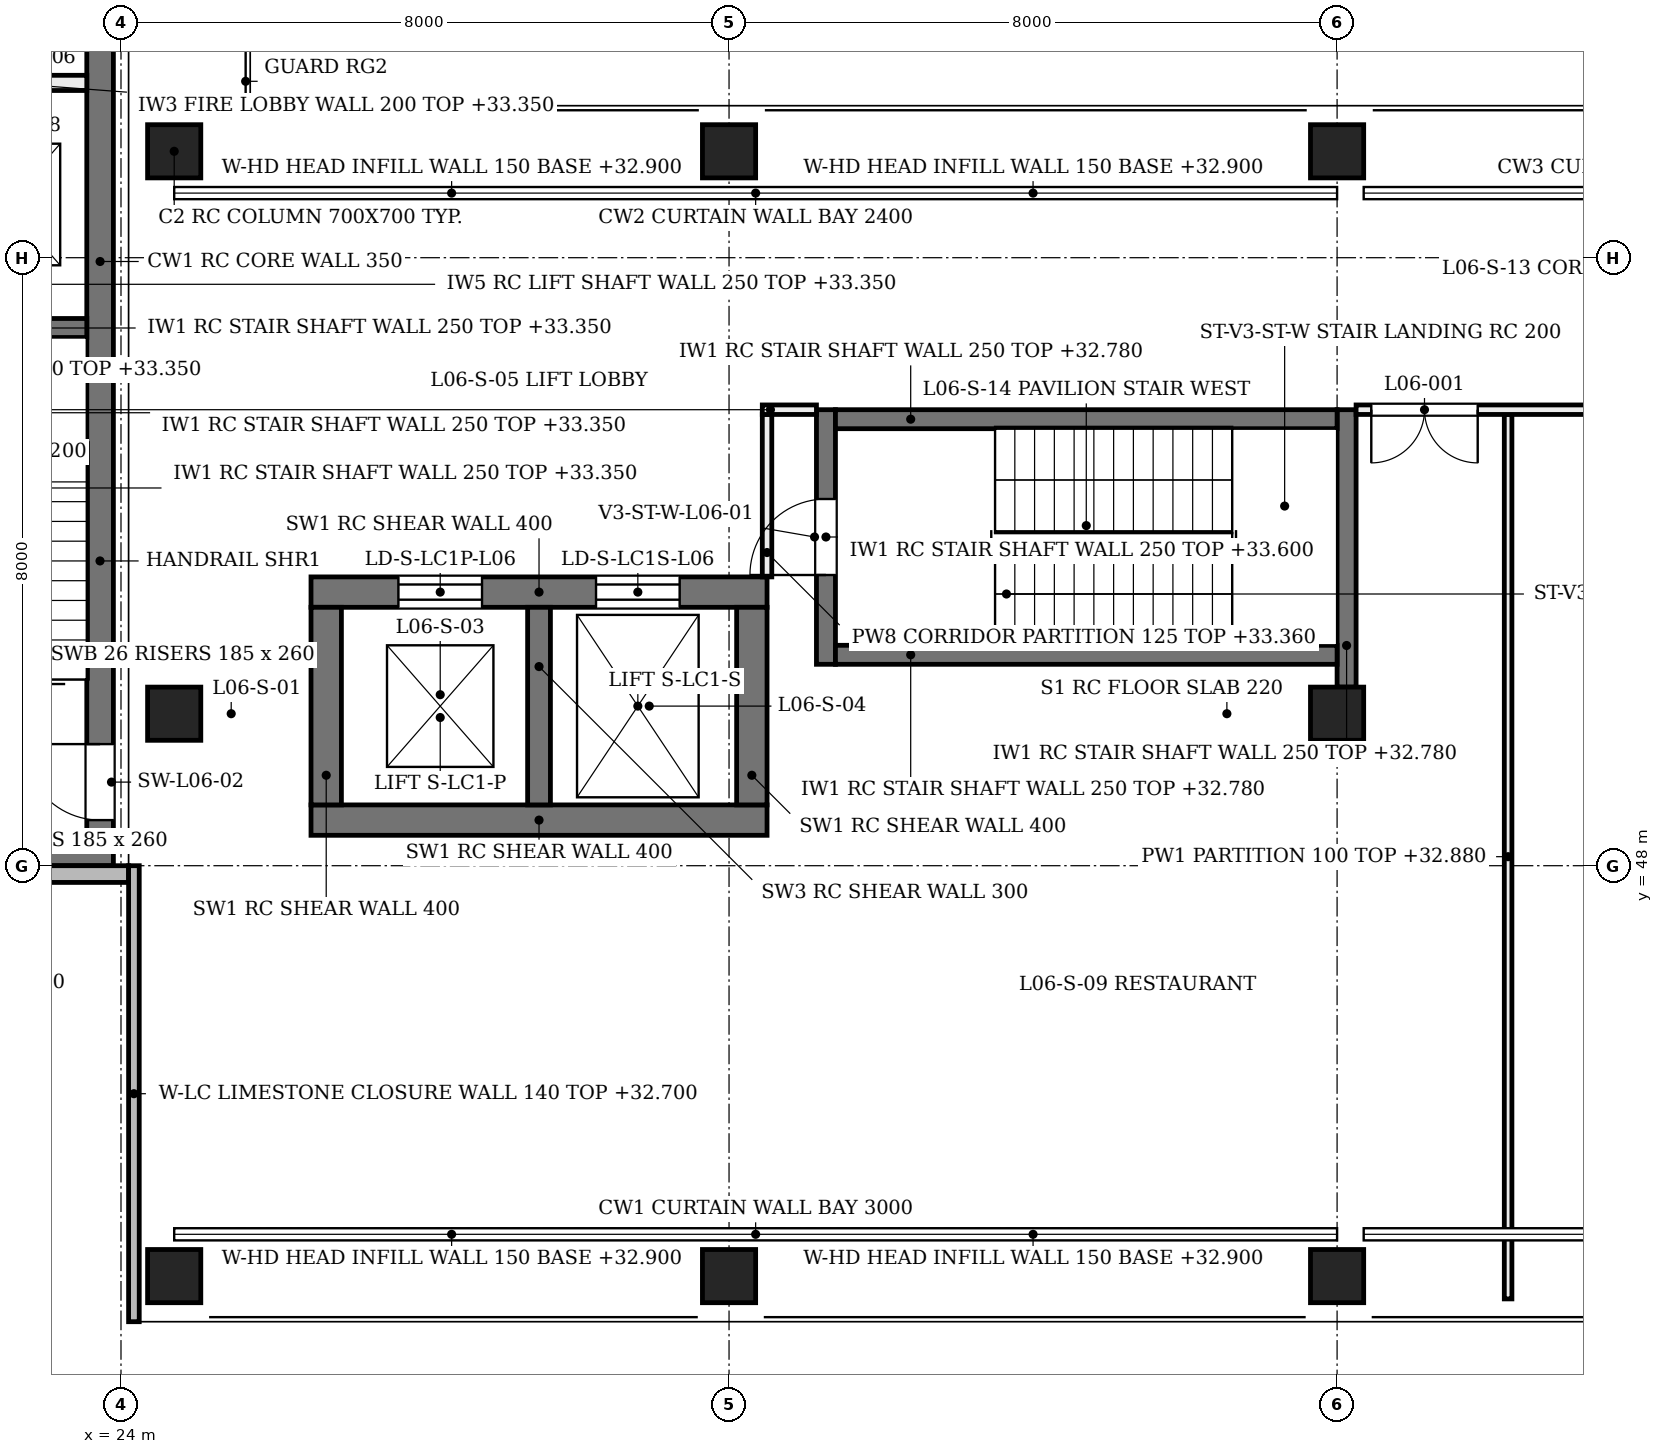
"""IFC4 building model, lengths in metres.
Left out: names, types, materials, properties, quantities, classifications, styles, units other than length and angle.
Written with IfcOpenShell. Run it as: python <this file> out.ifc"""

import sys

from ifc_helpers import new_model, si_unit, direction, frame, frame_2d, origin, origin_2d, place, context, subcontext, project, spatial, rectangle, extrude, element, fill, save


model = new_model("IFC4")
c1 = context("Model", 3, precision=1e-05, world=origin(), true_north=direction((0.0, 1.0)))
c2 = subcontext(c1, "Body", "Model", "MODEL_VIEW")
j1 = project(units=[si_unit("LENGTHUNIT", "METRE"), si_unit("PLANEANGLEUNIT", "RADIAN")], contexts=[c1])
p1 = place(None, origin())
s1 = spatial("IfcSite", under=j1, at=p1, CompositionType="ELEMENT")
p2 = place(p1, origin())
s2 = spatial("IfcBuilding", under=s1, at=p2, CompositionType="ELEMENT")
p3 = place(p2, frame((0.0, 0.0, 28.8)))
s3 = spatial("IfcBuildingStorey", under=s2, at=p3, CompositionType="ELEMENT", Elevation=28.8)
p4 = place(p3, frame((26.5, 48.6, 0.0), z_axis=(0.0, 0.0, 1.0), x_axis=(1.0, 0.0, 0.0)))
e1 = element("IfcWall", 1, at=p4, inside=s3, PredefinedType="SHEAR", context=c2, shape_type="SweptSolid", body=[
    extrude(rectangle(XDim=6.0, YDim=0.4, at=frame_2d((3.0, 0.0))), origin(), (0.0, 0.0, 1.0), 4.58),
])
p5 = place(p3, frame((26.5, 51.6, 0.0), z_axis=(0.0, 0.0, 1.0), x_axis=(1.0, 0.0, 0.0)))
e2 = element("IfcWall", 2, at=p5, inside=s3, PredefinedType="SHEAR", context=c2, shape_type="SweptSolid", body=[
    extrude(rectangle(XDim=6.0, YDim=0.4, at=frame_2d((3.0, 0.0))), origin(), (0.0, 0.0, 1.0), 4.58),
])
p6 = place(p5, frame((1.15, 0.0, 0.0)))
e3 = element("IfcOpeningElement", 3, at=p6, cuts=e2, PredefinedType="OPENING", context=c2, shape_type="SweptSolid", body=[
    extrude(rectangle(XDim=1.1, YDim=2.1, at=frame_2d((0.55, 1.05))), frame((0.0, 0.21, 0.0), z_axis=(0.0, -1.0, 0.0), x_axis=(1.0, 0.0, 0.0)), (0.0, 0.0, 1.0), 0.42),
])
p7 = place(p5, frame((3.75, 0.0, 0.0)))
e4 = element("IfcOpeningElement", 4, at=p7, cuts=e2, PredefinedType="OPENING", context=c2, shape_type="SweptSolid", body=[
    extrude(rectangle(XDim=1.1, YDim=2.1, at=frame_2d((0.55, 1.05))), frame((0.0, 0.21, 0.0), z_axis=(0.0, -1.0, 0.0), x_axis=(1.0, 0.0, 0.0)), (0.0, 0.0, 1.0), 0.42),
])
for number, where, z_axis, x_axis in (
    (5, (26.7, 48.8, 0.0), (0.0, 0.0, 1.0), (0.0, 1.0, 0.0)),
    (6, (32.3, 48.8, 0.0), (0.0, 0.0, 1.0), (0.0, 1.0, 0.0)),
):
    element("IfcWall", number, at=place(p3, frame(where, z_axis=z_axis, x_axis=x_axis)), inside=s3, PredefinedType="SHEAR", context=c2, shape_type="SweptSolid", body=[
        extrude(rectangle(XDim=2.6, YDim=0.4, at=frame_2d((1.3, 0.0))), origin(), (0.0, 0.0, 1.0), 4.58),
    ])
p8 = place(p3, frame((29.5, 48.8, 0.0), z_axis=(0.0, 0.0, 1.0), x_axis=(0.0, 1.0, 0.0)))
e7 = element("IfcWall", 7, at=p8, inside=s3, PredefinedType="SHEAR", context=c2, shape_type="SweptSolid", body=[
    extrude(rectangle(XDim=2.6, YDim=0.3, at=frame_2d((1.3, 0.0))), origin(), (0.0, 0.0, 1.0), 4.58),
])
p9 = place(p3, frame((15.95, 48.175, 0.0), z_axis=(0.0, 0.0, 1.0), x_axis=(1.0, 0.0, 0.0)))
e8 = element("IfcWall", 8, at=p9, inside=s3, PredefinedType="SHEAR", context=c2, shape_type="SweptSolid", body=[
    extrude(rectangle(XDim=7.95, YDim=0.35, at=frame_2d((3.975, 0.0))), origin(), (0.0, 0.0, 1.0), 4.58),
])
p10 = place(p3, frame((23.725, 48.35, 0.0), z_axis=(0.0, 0.0, 1.0), x_axis=(0.0, 1.0, 0.0)))
e9 = element("IfcWall", 9, at=p10, inside=s3, PredefinedType="SHEAR", context=c2, shape_type="SweptSolid", body=[
    extrude(rectangle(XDim=15.2, YDim=0.35, at=frame_2d((7.6, 0.0))), origin(), (0.0, 0.0, 1.0), 4.58),
])
p11 = place(p10, frame((0.25, 0.0, 0.0)))
e10 = element("IfcOpeningElement", 10, at=p11, cuts=e9, PredefinedType="OPENING", context=c2, shape_type="SweptSolid", body=[
    extrude(rectangle(XDim=1.0, YDim=2.1, at=frame_2d((0.5, 1.05))), frame((0.0, 0.185, 0.0), z_axis=(0.0, -1.0, 0.0), x_axis=(1.0, 0.0, 0.0)), (0.0, 0.0, 1.0), 0.37),
])
p12 = place(p10, frame((10.6, 0.0, 0.0)))
e11 = element("IfcOpeningElement", 11, at=p12, cuts=e9, PredefinedType="OPENING", context=c2, shape_type="SweptSolid", body=[
    extrude(rectangle(XDim=1.4, YDim=2.1, at=frame_2d((0.7, 1.05))), frame((0.0, 0.185, 0.0), z_axis=(0.0, -1.0, 0.0), x_axis=(1.0, 0.0, 0.0)), (0.0, 0.0, 1.0), 0.37),
])
for number, where, z_axis, x_axis in (
    (12, (24.7, 42.6, 0.0), (0.0, 0.0, 1.0), (1.0, 0.0, 0.0)),
    (13, (32.0, 42.6, 0.0), (0.0, 0.0, 1.0), (1.0, 0.0, 0.0)),
    (14, (40.0, 42.6, 0.0), (0.0, 0.0, 1.0), (1.0, 0.0, 0.0)),
    (15, (24.7, 50.0, 0.0), (0.0, 0.0, 1.0), (1.0, 0.0, 0.0)),
    (16, (40.0, 50.0, 0.0), (0.0, 0.0, 1.0), (1.0, 0.0, 0.0)),
    (17, (24.7, 57.4, 0.0), (0.0, 0.0, 1.0), (1.0, 0.0, 0.0)),
    (18, (32.0, 57.4, 0.0), (0.0, 0.0, 1.0), (1.0, 0.0, 0.0)),
    (19, (40.0, 57.4, 0.0), (0.0, 0.0, 1.0), (1.0, 0.0, 0.0)),
):
    element("IfcColumn", number, at=place(p3, frame(where, z_axis=z_axis, x_axis=x_axis)), inside=s3, PredefinedType="COLUMN", context=c2, shape_type="SweptSolid", body=[
        extrude(rectangle(XDim=0.7, YDim=0.7, at=origin_2d()), origin(), (0.0, 0.0, 1.0), 4.58),
    ])
p13 = place(p3, frame((24.9, 43.15, 4.1), z_axis=(0.0, 0.0, 1.0), x_axis=(1.0, 0.0, 0.0)))
e20 = element("IfcWall", 20, at=p13, inside=s3, PredefinedType="SOLIDWALL", context=c2, shape_type="SweptSolid", body=[
    extrude(rectangle(XDim=6.9, YDim=0.15, at=frame_2d((3.45, 0.0))), origin(), (0.0, 0.0, 1.0), 0.48),
])
p14 = place(p3, frame((32.2, 43.15, 4.1), z_axis=(0.0, 0.0, 1.0), x_axis=(1.0, 0.0, 0.0)))
e21 = element("IfcWall", 21, at=p14, inside=s3, PredefinedType="SOLIDWALL", context=c2, shape_type="SweptSolid", body=[
    extrude(rectangle(XDim=7.6, YDim=0.15, at=frame_2d((3.8, 0.0))), origin(), (0.0, 0.0, 1.0), 0.48),
])
p15 = place(p3, frame((24.9, 56.85, 4.1), z_axis=(0.0, 0.0, 1.0), x_axis=(1.0, 0.0, 0.0)))
e22 = element("IfcWall", 22, at=p15, inside=s3, PredefinedType="SOLIDWALL", context=c2, shape_type="SweptSolid", body=[
    extrude(rectangle(XDim=6.9, YDim=0.15, at=frame_2d((3.45, 0.0))), origin(), (0.0, 0.0, 1.0), 0.48),
])
p16 = place(p3, frame((32.2, 56.85, 4.1), z_axis=(0.0, 0.0, 1.0), x_axis=(1.0, 0.0, 0.0)))
e23 = element("IfcWall", 23, at=p16, inside=s3, PredefinedType="SOLIDWALL", context=c2, shape_type="SweptSolid", body=[
    extrude(rectangle(XDim=7.6, YDim=0.15, at=frame_2d((3.8, 0.0))), origin(), (0.0, 0.0, 1.0), 0.48),
])
p17 = place(p3, frame((15.9, 47.89, 0.0), z_axis=(0.0, 0.0, 1.0), x_axis=(1.0, 0.0, 0.0)))
e24 = element("IfcWall", 24, at=p17, inside=s3, PredefinedType="SOLIDWALL", context=c2, shape_type="SweptSolid", body=[
    extrude(rectangle(XDim=8.2, YDim=0.22, at=frame_2d((4.1, 0.0))), origin(), (0.0, 0.0, 1.0), 3.9),
])
p18 = place(p17, frame((1.108, 0.0, 0.9)))
e25 = element("IfcOpeningElement", 25, at=p18, cuts=e24, PredefinedType="OPENING", context=c2, shape_type="SweptSolid", body=[
    extrude(rectangle(XDim=0.45, YDim=2.6, at=frame_2d((0.225, 1.3))), frame((0.0, 0.12, 0.0), z_axis=(0.0, -1.0, 0.0), x_axis=(1.0, 0.0, 0.0)), (0.0, 0.0, 1.0), 0.24),
])
p19 = place(p17, frame((3.775, 0.0, 0.9)))
e26 = element("IfcOpeningElement", 26, at=p19, cuts=e24, PredefinedType="OPENING", context=c2, shape_type="SweptSolid", body=[
    extrude(rectangle(XDim=0.45, YDim=2.6, at=frame_2d((0.225, 1.3))), frame((0.0, 0.12, 0.0), z_axis=(0.0, -1.0, 0.0), x_axis=(1.0, 0.0, 0.0)), (0.0, 0.0, 1.0), 0.24),
])
p20 = place(p17, frame((6.442, 0.0, 0.9)))
e27 = element("IfcOpeningElement", 27, at=p20, cuts=e24, PredefinedType="OPENING", context=c2, shape_type="SweptSolid", body=[
    extrude(rectangle(XDim=0.45, YDim=2.6, at=frame_2d((0.225, 1.3))), frame((0.0, 0.12, 0.0), z_axis=(0.0, -1.0, 0.0), x_axis=(1.0, 0.0, 0.0)), (0.0, 0.0, 1.0), 0.24),
])
p21 = place(p3, frame((24.17, 42.0, 0.0), z_axis=(0.0, 0.0, 1.0), x_axis=(0.0, 1.0, 0.0)))
e28 = element("IfcWall", 28, at=p21, inside=s3, PredefinedType="SOLIDWALL", context=c2, shape_type="SweptSolid", body=[
    extrude(rectangle(XDim=6.0, YDim=0.14, at=frame_2d((3.0, 0.0))), origin(), (0.0, 0.0, 1.0), 3.9),
])
p22 = place(p3, frame((20.45, 55.075, 0.0), z_axis=(0.0, 0.0, 1.0), x_axis=(1.0, 0.0, 0.0)))
e29 = element("IfcWall", 29, at=p22, inside=s3, PredefinedType="SOLIDWALL", context=c2, shape_type="SweptSolid", body=[
    extrude(rectangle(XDim=3.1, YDim=0.25, at=frame_2d((1.55, 0.0))), origin(), (0.0, 0.0, 1.0), 4.55),
])
p23 = place(p3, frame((16.35, 58.3, 0.0), z_axis=(0.0, 0.0, 1.0), x_axis=(1.0, 0.0, 0.0)))
e30 = element("IfcWall", 30, at=p23, inside=s3, PredefinedType="SOLIDWALL", context=c2, shape_type="SweptSolid", body=[
    extrude(rectangle(XDim=7.2, YDim=0.2, at=frame_2d((3.6, 0.0))), origin(), (0.0, 0.0, 1.0), 4.55),
])
p24 = place(p23, frame((0.5, 0.0, 0.0)))
e31 = element("IfcOpeningElement", 31, at=p24, cuts=e30, PredefinedType="OPENING", context=c2, shape_type="SweptSolid", body=[
    extrude(rectangle(XDim=1.1, YDim=2.1, at=frame_2d((0.55, 1.05))), frame((0.0, 0.11, 0.0), z_axis=(0.0, -1.0, 0.0), x_axis=(1.0, 0.0, 0.0)), (0.0, 0.0, 1.0), 0.22),
])
p25 = place(p23, frame((5.6, 0.0, 0.0)))
e32 = element("IfcOpeningElement", 32, at=p25, cuts=e30, PredefinedType="OPENING", context=c2, shape_type="SweptSolid", body=[
    extrude(rectangle(XDim=1.1, YDim=2.1, at=frame_2d((0.55, 1.05))), frame((0.0, 0.11, 0.0), z_axis=(0.0, -1.0, 0.0), x_axis=(1.0, 0.0, 0.0)), (0.0, 0.0, 1.0), 0.22),
])
p26 = place(p23, frame((3.1, 0.0, 0.0)))
e33 = element("IfcOpeningElement", 33, at=p26, cuts=e30, PredefinedType="OPENING", context=c2, shape_type="SweptSolid", body=[
    extrude(rectangle(XDim=1.0, YDim=2.1, at=frame_2d((0.5, 1.05))), frame((0.0, 0.11, 0.0), z_axis=(0.0, -1.0, 0.0), x_axis=(1.0, 0.0, 0.0)), (0.0, 0.0, 1.0), 0.22),
])
p27 = place(p3, frame((33.275, 50.65, 0.0), z_axis=(0.0, 0.0, 1.0), x_axis=(0.0, 1.0, 0.0)))
e34 = element("IfcWall", 34, at=p27, inside=s3, PredefinedType="SOLIDWALL", context=c2, shape_type="SweptSolid", body=[
    extrude(rectangle(XDim=3.35, YDim=0.25, at=frame_2d((1.675, 0.0))), origin(), (0.0, 0.0, 1.0), 4.8),
])
p28 = place(p27, frame((1.175, 0.0, 0.0)))
e35 = element("IfcOpeningElement", 35, at=p28, cuts=e34, PredefinedType="OPENING", context=c2, shape_type="SweptSolid", body=[
    extrude(rectangle(XDim=1.0, YDim=2.1, at=frame_2d((0.5, 1.05))), frame((0.0, 0.135, 0.0), z_axis=(0.0, -1.0, 0.0), x_axis=(1.0, 0.0, 0.0)), (0.0, 0.0, 1.0), 0.27),
])
p29 = place(p3, frame((40.125, 50.35, 0.0), z_axis=(0.0, 0.0, 1.0), x_axis=(0.0, 1.0, 0.0)))
e36 = element("IfcWall", 36, at=p29, inside=s3, PredefinedType="SOLIDWALL", context=c2, shape_type="SweptSolid", body=[
    extrude(rectangle(XDim=3.65, YDim=0.25, at=frame_2d((1.825, 0.0))), origin(), (0.0, 0.0, 1.0), 3.98),
])
for number, where, z_axis, x_axis in (
    (37, (33.4, 50.775, 0.0), (0.0, 0.0, 1.0), (1.0, 0.0, 0.0)),
    (38, (33.4, 53.875, 0.0), (0.0, 0.0, 1.0), (1.0, 0.0, 0.0)),
):
    element("IfcWall", number, at=place(p3, frame(where, z_axis=z_axis, x_axis=x_axis)), inside=s3, PredefinedType="SOLIDWALL", context=c2, shape_type="SweptSolid", body=[
        extrude(rectangle(XDim=6.6, YDim=0.25, at=frame_2d((3.3, 0.0))), origin(), (0.0, 0.0, 1.0), 3.98),
    ])
p30 = place(p3, frame((32.5, 51.8, 0.0), z_axis=(0.0, 0.0, 1.0), x_axis=(0.0, 1.0, 0.0)))
e39 = element("IfcWall", 39, at=p30, inside=s3, PredefinedType="PARTITIONING", context=c2, shape_type="SweptSolid", body=[
    extrude(rectangle(XDim=2.137, YDim=0.125, at=frame_2d((1.069, 0.0))), origin(), (0.0, 0.0, 1.0), 4.56),
])
p31 = place(p3, frame((42.25, 42.3, 0.0), z_axis=(0.0, 0.0, 1.0), x_axis=(0.0, 1.0, 0.0)))
e40 = element("IfcWall", 40, at=p31, inside=s3, PredefinedType="PARTITIONING", context=c2, shape_type="SweptSolid", body=[
    extrude(rectangle(XDim=11.637, YDim=0.1, at=frame_2d((5.819, 0.0))), origin(), (0.0, 0.0, 1.0), 4.08),
])
p32 = place(p3, frame((32.438, 54.0, 0.0), z_axis=(0.0, 0.0, 1.0), x_axis=(1.0, 0.0, 0.0)))
e41 = element("IfcWall", 41, at=p32, inside=s3, PredefinedType="PARTITIONING", context=c2, shape_type="SweptSolid", body=[
    extrude(rectangle(XDim=0.712, YDim=0.125, at=frame_2d((0.356, 0.0))), origin(), (0.0, 0.0, 1.0), 4.56),
])
p33 = place(p3, frame((40.25, 54.0, 0.0), z_axis=(0.0, 0.0, 1.0), x_axis=(1.0, 0.0, 0.0)))
e42 = element("IfcWall", 42, at=p33, inside=s3, PredefinedType="PARTITIONING", context=c2, shape_type="SweptSolid", body=[
    extrude(rectangle(XDim=23.5, YDim=0.125, at=frame_2d((11.75, 0.0))), origin(), (0.0, 0.0, 1.0), 3.98),
])
p34 = place(p33, frame((0.2, 0.0, 0.0)))
e43 = element("IfcOpeningElement", 43, at=p34, cuts=e42, PredefinedType="OPENING", context=c2, shape_type="SweptSolid", body=[
    extrude(rectangle(XDim=1.4, YDim=2.2, at=frame_2d((0.7, 1.1))), frame((0.0, 0.073, 0.0), z_axis=(0.0, -1.0, 0.0), x_axis=(1.0, 0.0, 0.0)), (0.0, 0.0, 1.0), 0.145),
])
p35 = place(p33, frame((6.179, 0.0, 0.0)))
e44 = element("IfcOpeningElement", 44, at=p35, cuts=e42, PredefinedType="OPENING", context=c2, shape_type="SweptSolid", body=[
    extrude(rectangle(XDim=1.6, YDim=2.2, at=frame_2d((0.8, 1.1))), frame((0.0, 0.073, 0.0), z_axis=(0.0, -1.0, 0.0), x_axis=(1.0, 0.0, 0.0)), (0.0, 0.0, 1.0), 0.145),
])
p36 = place(p33, frame((15.929, 0.0, 0.0)))
e45 = element("IfcOpeningElement", 45, at=p36, cuts=e42, PredefinedType="OPENING", context=c2, shape_type="SweptSolid", body=[
    extrude(rectangle(XDim=1.6, YDim=2.2, at=frame_2d((0.8, 1.1))), frame((0.0, 0.073, 0.0), z_axis=(0.0, -1.0, 0.0), x_axis=(1.0, 0.0, 0.0)), (0.0, 0.0, 1.0), 0.145),
])
p37 = place(p33, frame((21.809, 0.0, 0.0)))
e46 = element("IfcOpeningElement", 46, at=p37, cuts=e42, PredefinedType="OPENING", context=c2, shape_type="SweptSolid", body=[
    extrude(rectangle(XDim=1.4, YDim=2.2, at=frame_2d((0.7, 1.1))), frame((0.0, 0.073, 0.0), z_axis=(0.0, -1.0, 0.0), x_axis=(1.0, 0.0, 0.0)), (0.0, 0.0, 1.0), 0.145),
])
p38 = place(p11, frame((1.0, 0.0, 0.0), z_axis=(0.0, 0.0, 1.0), x_axis=(-1.0, 0.0, 0.0)))
e47 = element("IfcDoor", 47, at=p38, inside=s3, OperationType="SINGLE_SWING_RIGHT", PredefinedType="DOOR", context=c2, shape_type="SweptSolid", body=[
    extrude(rectangle(XDim=1.0, YDim=2.1, at=frame_2d((0.5, 1.05))), frame((0.0, 0.025, 0.0), z_axis=(0.0, -1.0, 0.0), x_axis=(1.0, 0.0, 0.0)), (0.0, 0.0, 1.0), 0.05),
])
fill(e10, e47)
p39 = place(p6, origin())
e48 = element("IfcDoor", 48, at=p39, inside=s3, OperationType="DOUBLE_DOOR_SLIDING", PredefinedType="DOOR", context=c2, shape_type="SweptSolid", body=[
    extrude(rectangle(XDim=1.1, YDim=2.1, at=frame_2d((0.55, 1.05))), frame((0.0, 0.025, 0.0), z_axis=(0.0, -1.0, 0.0), x_axis=(1.0, 0.0, 0.0)), (0.0, 0.0, 1.0), 0.05),
])
fill(e3, e48)
p40 = place(p7, origin())
e49 = element("IfcDoor", 49, at=p40, inside=s3, OperationType="DOUBLE_DOOR_SLIDING", PredefinedType="DOOR", context=c2, shape_type="SweptSolid", body=[
    extrude(rectangle(XDim=1.1, YDim=2.1, at=frame_2d((0.55, 1.05))), frame((0.0, 0.025, 0.0), z_axis=(0.0, -1.0, 0.0), x_axis=(1.0, 0.0, 0.0)), (0.0, 0.0, 1.0), 0.05),
])
fill(e4, e49)
p41 = place(p28, origin())
e50 = element("IfcDoor", 50, at=p41, inside=s3, OperationType="SINGLE_SWING_LEFT", PredefinedType="DOOR", context=c2, shape_type="SweptSolid", body=[
    extrude(rectangle(XDim=1.0, YDim=2.1, at=frame_2d((0.5, 1.05))), frame((0.0, 0.025, 0.0), z_axis=(0.0, -1.0, 0.0), x_axis=(1.0, 0.0, 0.0)), (0.0, 0.0, 1.0), 0.05),
])
fill(e35, e50)
p42 = place(p34, frame((1.4, 0.0, 0.0), z_axis=(0.0, 0.0, 1.0), x_axis=(-1.0, 0.0, 0.0)))
e51 = element("IfcDoor", 51, at=p42, inside=s3, OperationType="DOUBLE_DOOR_SINGLE_SWING", PredefinedType="DOOR", context=c2, shape_type="SweptSolid", body=[
    extrude(rectangle(XDim=1.4, YDim=2.2, at=frame_2d((0.7, 1.1))), frame((0.0, 0.025, 0.0), z_axis=(0.0, -1.0, 0.0), x_axis=(1.0, 0.0, 0.0)), (0.0, 0.0, 1.0), 0.05),
])
fill(e43, e51)
save(model, sys.argv[1])
